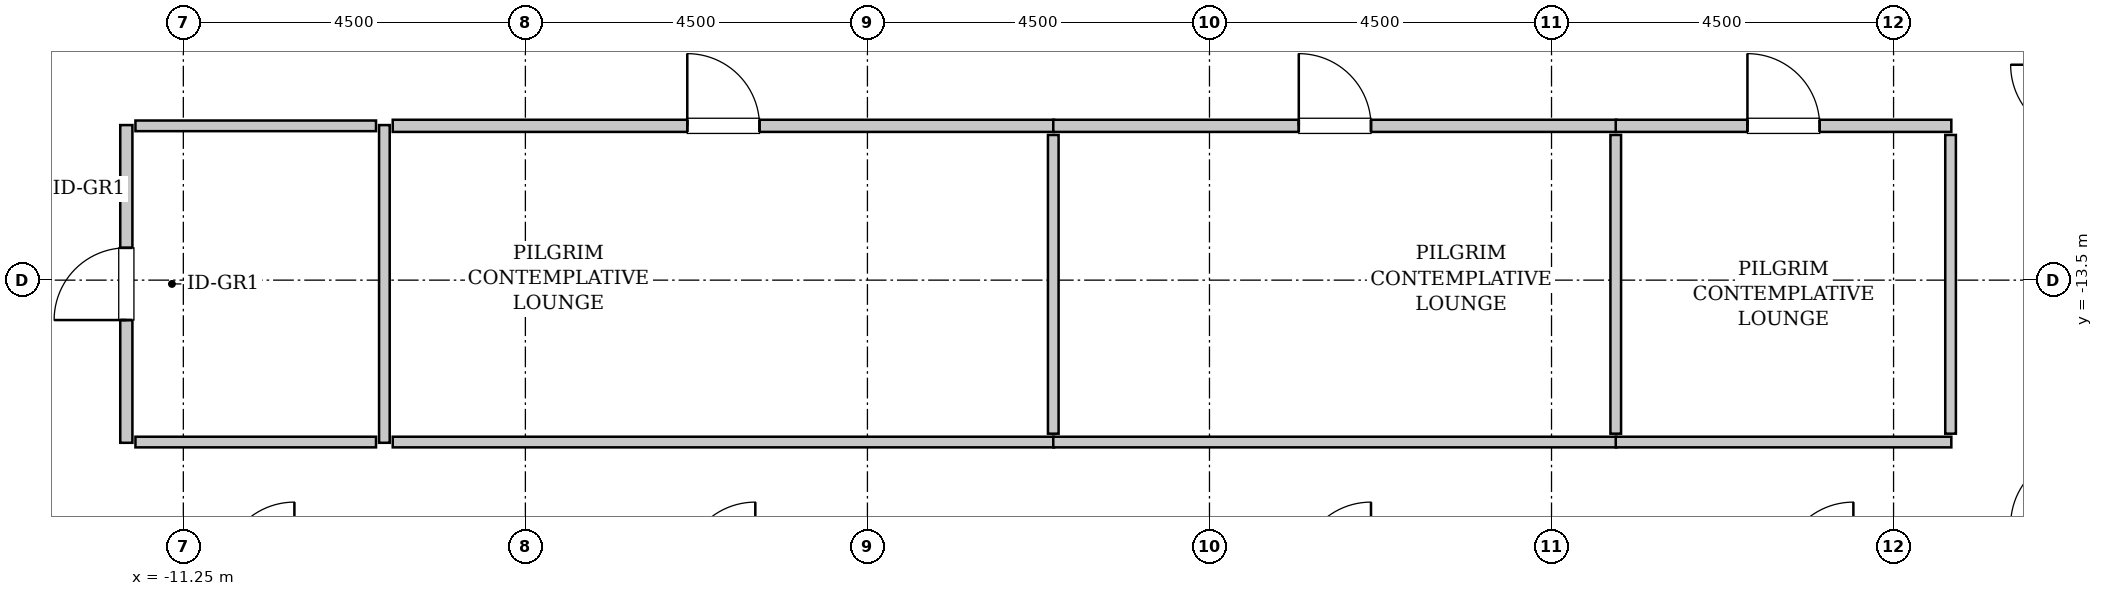
"""IFC4 building model, lengths in metres.
Left out: names, types, materials, properties, quantities, classifications, styles, units other than length and angle.
Written with IfcOpenShell. Run it as: python <this file> out.ifc"""

import sys

from ifc_helpers import new_model, si_unit, direction, frame, frame_2d, origin, place, context, subcontext, project, spatial, rectangle, extrude, source, transform, mapped, element, fill, save


model = new_model("IFC4")
c1 = context("Model", 3, precision=1e-05, world=origin(), true_north=direction((0.0, 1.0)))
c2 = subcontext(c1, "Body", "Model", "MODEL_VIEW")
j1 = project(units=[si_unit("LENGTHUNIT", "METRE"), si_unit("PLANEANGLEUNIT", "RADIAN")], contexts=[c1])
p1 = place(None, origin())
s1 = spatial("IfcSite", under=j1, at=p1, CompositionType="ELEMENT")
p2 = place(p1, origin())
s2 = spatial("IfcBuilding", under=s1, at=p2, CompositionType="ELEMENT")
p3 = place(p2, frame((0.0, 0.0, 160.2)))
s3 = spatial("IfcBuildingStorey", under=s2, at=p3, CompositionType="ELEMENT", Elevation=160.2)
m1 = source(origin(), c2, "Body", "SweptSolid", [
    extrude(rectangle(XDim=4.18, YDim=0.16, at=frame_2d((2.09, 0.0))), origin(), (0.0, 0.0, 1.0), 3.535),
])
p4 = place(p3, frame((-12.0, -15.64, 0.0), z_axis=(0.0, 0.0, 1.0), x_axis=(0.0, 1.0, 0.0)))
e1 = element("IfcWall", 1, at=p4, inside=s3, PredefinedType="PARTITIONING", context=c2, shape_type="MappedRepresentation", body=[
    mapped(m1, transform((0.0, 0.0, 0.0), x_axis=(1.0, 0.0, 0.0), y_axis=(0.0, 1.0, 0.0), z_axis=(0.0, 0.0, 1.0), scale=1.0)),
])
p5 = place(p4, frame((1.615, 0.0, 0.0)))
e2 = element("IfcOpeningElement", 2, at=p5, cuts=e1, PredefinedType="OPENING", context=c2, shape_type="SweptSolid", body=[
    extrude(rectangle(XDim=0.95, YDim=2.1, at=frame_2d((0.475, 1.05))), frame((0.0, 0.09, 0.0), z_axis=(0.0, -1.0, 0.0), x_axis=(1.0, 0.0, 0.0)), (0.0, 0.0, 1.0), 0.18),
])
m2 = source(origin(), c2, "Body", "SweptSolid", [
    extrude(rectangle(XDim=4.18, YDim=0.14, at=frame_2d((2.09, 0.0))), origin(), (0.0, 0.0, 1.0), 3.535),
])
p6 = place(p3, frame((-8.605, -15.64, 0.0), z_axis=(0.0, 0.0, 1.0), x_axis=(0.0, 1.0, 0.0)))
e3 = element("IfcWall", 3, at=p6, inside=s3, PredefinedType="PARTITIONING", context=c2, shape_type="MappedRepresentation", body=[
    mapped(m2, transform((0.0, 0.0, 0.0), x_axis=(1.0, 0.0, 0.0), y_axis=(0.0, 1.0, 0.0), z_axis=(0.0, 0.0, 1.0), scale=1.0)),
])
m3 = source(origin(), c2, "Body", "SweptSolid", [
    extrude(rectangle(XDim=3.165, YDim=0.14, at=frame_2d((1.583, 0.0))), origin(), (0.0, 0.0, 1.0), 3.535),
])
for number, where, z_axis, x_axis in (
    (4, (-11.88, -11.47, 0.0), (0.0, 0.0, 1.0), (1.0, 0.0, 0.0)),
    (5, (-11.88, -15.63, 0.0), (0.0, 0.0, 1.0), (1.0, 0.0, 0.0)),
):
    element("IfcWall", number, at=place(p3, frame(where, z_axis=z_axis, x_axis=x_axis)), inside=s3, PredefinedType="PARTITIONING", context=c2, shape_type="MappedRepresentation", body=[
        mapped(m3, transform((0.0, 0.0, 0.0), x_axis=(1.0, 0.0, 0.0), y_axis=(0.0, 1.0, 0.0), z_axis=(0.0, 0.0, 1.0), scale=1.0)),
    ])
m4 = source(origin(), c2, "Body", "SweptSolid", [
    extrude(rectangle(XDim=8.7, YDim=0.16, at=frame_2d((4.35, 0.0))), origin(), (0.0, 0.0, 1.0), 3.535),
])
p7 = place(p3, frame((-8.495, -11.47, 0.0), z_axis=(0.0, 0.0, 1.0), x_axis=(1.0, 0.0, 0.0)))
e6 = element("IfcWall", 6, at=p7, inside=s3, PredefinedType="PARTITIONING", context=c2, shape_type="MappedRepresentation", body=[
    mapped(m4, transform((0.0, 0.0, 0.0), x_axis=(1.0, 0.0, 0.0), y_axis=(0.0, 1.0, 0.0), z_axis=(0.0, 0.0, 1.0), scale=1.0)),
])
p8 = place(p7, frame((3.875, 0.0, 0.0)))
e7 = element("IfcOpeningElement", 7, at=p8, cuts=e6, PredefinedType="OPENING", context=c2, shape_type="SweptSolid", body=[
    extrude(rectangle(XDim=0.95, YDim=2.1, at=frame_2d((0.475, 1.05))), frame((0.0, 0.09, 0.0), z_axis=(0.0, -1.0, 0.0), x_axis=(1.0, 0.0, 0.0)), (0.0, 0.0, 1.0), 0.18),
])
m5 = source(origin(), c2, "Body", "SweptSolid", [
    extrude(rectangle(XDim=8.7, YDim=0.14, at=frame_2d((4.35, 0.0))), origin(), (0.0, 0.0, 1.0), 3.535),
])
p9 = place(p3, frame((-8.495, -15.63, 0.0), z_axis=(0.0, 0.0, 1.0), x_axis=(1.0, 0.0, 0.0)))
e8 = element("IfcWall", 8, at=p9, inside=s3, PredefinedType="PARTITIONING", context=c2, shape_type="MappedRepresentation", body=[
    mapped(m5, transform((0.0, 0.0, 0.0), x_axis=(1.0, 0.0, 0.0), y_axis=(0.0, 1.0, 0.0), z_axis=(0.0, 0.0, 1.0), scale=1.0)),
])
m6 = source(origin(), c2, "Body", "SweptSolid", [
    extrude(rectangle(XDim=3.93, YDim=0.14, at=frame_2d((1.965, 0.0))), origin(), (0.0, 0.0, 1.0), 3.535),
])
p10 = place(p3, frame((0.195, -15.52, 0.0), z_axis=(0.0, 0.0, 1.0), x_axis=(0.0, 1.0, 0.0)))
e9 = element("IfcWall", 9, at=p10, inside=s3, PredefinedType="PARTITIONING", context=c2, shape_type="MappedRepresentation", body=[
    mapped(m6, transform((0.0, 0.0, 0.0), x_axis=(1.0, 0.0, 0.0), y_axis=(0.0, 1.0, 0.0), z_axis=(0.0, 0.0, 1.0), scale=1.0)),
])
m7 = source(origin(), c2, "Body", "SweptSolid", [
    extrude(rectangle(XDim=7.41, YDim=0.16, at=frame_2d((3.705, 0.0))), origin(), (0.0, 0.0, 1.0), 3.535),
])
p11 = place(p3, frame((0.195, -11.47, 0.0), z_axis=(0.0, 0.0, 1.0), x_axis=(1.0, 0.0, 0.0)))
e10 = element("IfcWall", 10, at=p11, inside=s3, PredefinedType="PARTITIONING", context=c2, shape_type="MappedRepresentation", body=[
    mapped(m7, transform((0.0, 0.0, 0.0), x_axis=(1.0, 0.0, 0.0), y_axis=(0.0, 1.0, 0.0), z_axis=(0.0, 0.0, 1.0), scale=1.0)),
])
p12 = place(p11, frame((3.23, 0.0, 0.0)))
e11 = element("IfcOpeningElement", 11, at=p12, cuts=e10, PredefinedType="OPENING", context=c2, shape_type="SweptSolid", body=[
    extrude(rectangle(XDim=0.95, YDim=2.1, at=frame_2d((0.475, 1.05))), frame((0.0, 0.09, 0.0), z_axis=(0.0, -1.0, 0.0), x_axis=(1.0, 0.0, 0.0)), (0.0, 0.0, 1.0), 0.18),
])
m8 = source(origin(), c2, "Body", "SweptSolid", [
    extrude(rectangle(XDim=7.41, YDim=0.14, at=frame_2d((3.705, 0.0))), origin(), (0.0, 0.0, 1.0), 3.535),
])
p13 = place(p3, frame((0.195, -15.63, 0.0), z_axis=(0.0, 0.0, 1.0), x_axis=(1.0, 0.0, 0.0)))
e12 = element("IfcWall", 12, at=p13, inside=s3, PredefinedType="PARTITIONING", context=c2, shape_type="MappedRepresentation", body=[
    mapped(m8, transform((0.0, 0.0, 0.0), x_axis=(1.0, 0.0, 0.0), y_axis=(0.0, 1.0, 0.0), z_axis=(0.0, 0.0, 1.0), scale=1.0)),
])
p14 = place(p3, frame((7.595, -15.52, 0.0), z_axis=(0.0, 0.0, 1.0), x_axis=(0.0, 1.0, 0.0)))
e13 = element("IfcWall", 13, at=p14, inside=s3, PredefinedType="PARTITIONING", context=c2, shape_type="MappedRepresentation", body=[
    mapped(m6, transform((0.0, 0.0, 0.0), x_axis=(1.0, 0.0, 0.0), y_axis=(0.0, 1.0, 0.0), z_axis=(0.0, 0.0, 1.0), scale=1.0)),
])
m9 = source(origin(), c2, "Body", "SweptSolid", [
    extrude(rectangle(XDim=4.415, YDim=0.16, at=frame_2d((2.208, 0.0))), origin(), (0.0, 0.0, 1.0), 3.535),
])
p15 = place(p3, frame((7.595, -11.47, 0.0), z_axis=(0.0, 0.0, 1.0), x_axis=(1.0, 0.0, 0.0)))
e14 = element("IfcWall", 14, at=p15, inside=s3, PredefinedType="PARTITIONING", context=c2, shape_type="MappedRepresentation", body=[
    mapped(m9, transform((0.0, 0.0, 0.0), x_axis=(1.0, 0.0, 0.0), y_axis=(0.0, 1.0, 0.0), z_axis=(0.0, 0.0, 1.0), scale=1.0)),
])
p16 = place(p15, frame((1.732, 0.0, 0.0)))
e15 = element("IfcOpeningElement", 15, at=p16, cuts=e14, PredefinedType="OPENING", context=c2, shape_type="SweptSolid", body=[
    extrude(rectangle(XDim=0.95, YDim=2.1, at=frame_2d((0.475, 1.05))), frame((0.0, 0.09, 0.0), z_axis=(0.0, -1.0, 0.0), x_axis=(1.0, 0.0, 0.0)), (0.0, 0.0, 1.0), 0.18),
])
m10 = source(origin(), c2, "Body", "SweptSolid", [
    extrude(rectangle(XDim=4.415, YDim=0.14, at=frame_2d((2.208, 0.0))), origin(), (0.0, 0.0, 1.0), 3.535),
])
p17 = place(p3, frame((7.595, -15.63, 0.0), z_axis=(0.0, 0.0, 1.0), x_axis=(1.0, 0.0, 0.0)))
e16 = element("IfcWall", 16, at=p17, inside=s3, PredefinedType="PARTITIONING", context=c2, shape_type="MappedRepresentation", body=[
    mapped(m10, transform((0.0, 0.0, 0.0), x_axis=(1.0, 0.0, 0.0), y_axis=(0.0, 1.0, 0.0), z_axis=(0.0, 0.0, 1.0), scale=1.0)),
])
p18 = place(p3, frame((12.0, -15.52, 0.0), z_axis=(0.0, 0.0, 1.0), x_axis=(0.0, 1.0, 0.0)))
e17 = element("IfcWall", 17, at=p18, inside=s3, PredefinedType="PARTITIONING", context=c2, shape_type="MappedRepresentation", body=[
    mapped(m6, transform((0.0, 0.0, 0.0), x_axis=(1.0, 0.0, 0.0), y_axis=(0.0, 1.0, 0.0), z_axis=(0.0, 0.0, 1.0), scale=1.0)),
])
m11 = source(origin(), c2, "Body", "SweptSolid", [
    extrude(rectangle(XDim=0.95, YDim=2.1, at=frame_2d((0.475, 1.05))), frame((0.0, 0.025, 0.0), z_axis=(0.0, -1.0, 0.0), x_axis=(1.0, 0.0, 0.0)), (0.0, 0.0, 1.0), 0.05),
])
p19 = place(p5, origin())
e18 = element("IfcDoor", 18, at=p19, inside=s3, OperationType="SINGLE_SWING_LEFT", PredefinedType="DOOR", context=c2, shape_type="MappedRepresentation", body=[
    mapped(m11, transform((0.0, 0.0, 0.0), x_axis=(1.0, 0.0, 0.0), y_axis=(0.0, 1.0, 0.0), z_axis=(0.0, 0.0, 1.0), scale=1.0)),
])
fill(e2, e18)
p20 = place(p8, origin())
e19 = element("IfcDoor", 19, at=p20, inside=s3, OperationType="SINGLE_SWING_LEFT", PredefinedType="DOOR", context=c2, shape_type="MappedRepresentation", body=[
    mapped(m11, transform((0.0, 0.0, 0.0), x_axis=(1.0, 0.0, 0.0), y_axis=(0.0, 1.0, 0.0), z_axis=(0.0, 0.0, 1.0), scale=1.0)),
])
fill(e7, e19)
p21 = place(p12, origin())
e20 = element("IfcDoor", 20, at=p21, inside=s3, OperationType="SINGLE_SWING_LEFT", PredefinedType="DOOR", context=c2, shape_type="MappedRepresentation", body=[
    mapped(m11, transform((0.0, 0.0, 0.0), x_axis=(1.0, 0.0, 0.0), y_axis=(0.0, 1.0, 0.0), z_axis=(0.0, 0.0, 1.0), scale=1.0)),
])
fill(e11, e20)
p22 = place(p16, origin())
e21 = element("IfcDoor", 21, at=p22, inside=s3, OperationType="SINGLE_SWING_LEFT", PredefinedType="DOOR", context=c2, shape_type="MappedRepresentation", body=[
    mapped(m11, transform((0.0, 0.0, 0.0), x_axis=(1.0, 0.0, 0.0), y_axis=(0.0, 1.0, 0.0), z_axis=(0.0, 0.0, 1.0), scale=1.0)),
])
fill(e15, e21)
save(model, sys.argv[1])
